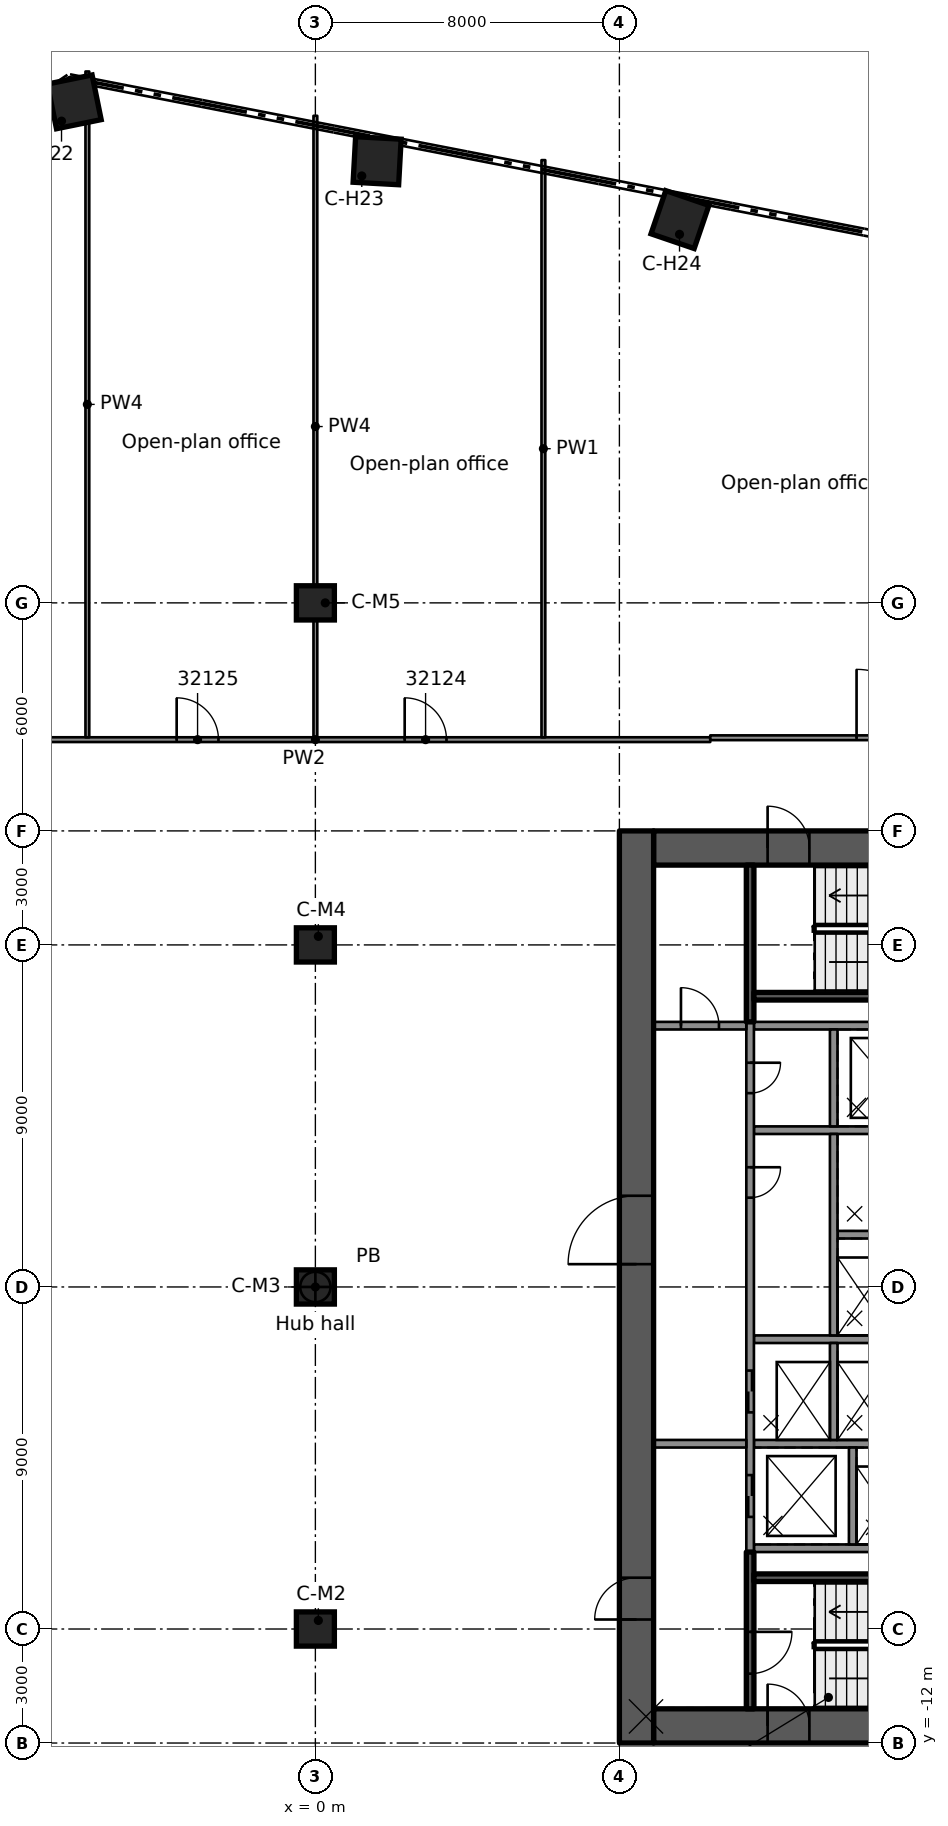
"""IFC4 building model, lengths in metres.
Left out: names, types, materials, properties, quantities, classifications, styles, units other than length and angle.
Written with IfcOpenShell. Run it as: python <this file> out.ifc"""

import sys

from ifc_helpers import new_model, si_unit, direction, frame, frame_2d, origin, origin_2d, place, context, subcontext, project, spatial, rectangle, extrude, element, fill, save


model = new_model("IFC4")
c1 = context("Model", 3, precision=1e-05, world=origin(), true_north=direction((0.0, 1.0)))
c2 = subcontext(c1, "Body", "Model", "MODEL_VIEW")
j1 = project(units=[si_unit("LENGTHUNIT", "METRE"), si_unit("PLANEANGLEUNIT", "RADIAN")], contexts=[c1])
p1 = place(None, origin())
s1 = spatial("IfcSite", under=j1, at=p1, CompositionType="ELEMENT")
p2 = place(p1, origin())
s2 = spatial("IfcBuilding", under=s1, at=p2, CompositionType="ELEMENT")
p3 = place(p2, frame((0.0, 0.0, 159.6)))
s3 = spatial("IfcBuildingStorey", under=s2, at=p3, CompositionType="ELEMENT", Elevation=159.6)
p4 = place(p3, frame((8.9, 11.55, 0.0), z_axis=(0.0, 0.0, 1.0), x_axis=(1.0, 0.0, 0.0)))
e1 = element("IfcWall", 1, at=p4, inside=s3, PredefinedType="SHEAR", context=c2, shape_type="SweptSolid", body=[
    extrude(rectangle(XDim=9.2, YDim=0.9, at=frame_2d((4.6, 0.0))), origin(), (0.0, 0.0, 1.0), 3.5),
])
p5 = place(p4, frame((3.0, 0.0, 0.0)))
e2 = element("IfcOpeningElement", 2, at=p5, cuts=e1, PredefinedType="OPENING", context=c2, shape_type="SweptSolid", body=[
    extrude(rectangle(XDim=1.1, YDim=2.1, at=frame_2d((0.55, 1.05))), frame((0.0, 0.46, 0.0), z_axis=(0.0, -1.0, 0.0), x_axis=(1.0, 0.0, 0.0)), (0.0, 0.0, 1.0), 0.92),
])
p6 = place(p3, frame((8.9, -11.55, 0.0), z_axis=(0.0, 0.0, 1.0), x_axis=(1.0, 0.0, 0.0)))
e3 = element("IfcWall", 3, at=p6, inside=s3, PredefinedType="SHEAR", context=c2, shape_type="SweptSolid", body=[
    extrude(rectangle(XDim=9.2, YDim=0.9, at=frame_2d((4.6, 0.0))), origin(), (0.0, 0.0, 1.0), 3.5),
])
p7 = place(p6, frame((3.0, 0.0, 0.0)))
e4 = element("IfcOpeningElement", 4, at=p7, cuts=e3, PredefinedType="OPENING", context=c2, shape_type="SweptSolid", body=[
    extrude(rectangle(XDim=1.1, YDim=2.1, at=frame_2d((0.55, 1.05))), frame((0.0, 0.46, 0.0), z_axis=(0.0, -1.0, 0.0), x_axis=(1.0, 0.0, 0.0)), (0.0, 0.0, 1.0), 0.92),
])
p8 = place(p3, frame((8.45, -12.0, 0.0), z_axis=(0.0, 0.0, 1.0), x_axis=(0.0, 1.0, 0.0)))
e5 = element("IfcWall", 5, at=p8, inside=s3, PredefinedType="SHEAR", context=c2, shape_type="SweptSolid", body=[
    extrude(rectangle(XDim=24.0, YDim=0.9, at=frame_2d((12.0, 0.0))), origin(), (0.0, 0.0, 1.0), 3.5),
])
p9 = place(p8, frame((12.6, 0.0, 0.0)))
e6 = element("IfcOpeningElement", 6, at=p9, cuts=e5, PredefinedType="OPENING", context=c2, shape_type="SweptSolid", body=[
    extrude(rectangle(XDim=1.8, YDim=2.1, at=frame_2d((0.9, 1.05))), frame((0.0, 0.46, 0.0), z_axis=(0.0, -1.0, 0.0), x_axis=(1.0, 0.0, 0.0)), (0.0, 0.0, 1.0), 0.92),
])
p10 = place(p8, frame((3.25, 0.0, 0.0)))
e7 = element("IfcOpeningElement", 7, at=p10, cuts=e5, PredefinedType="OPENING", context=c2, shape_type="SweptSolid", body=[
    extrude(rectangle(XDim=1.1, YDim=2.1, at=frame_2d((0.55, 1.05))), frame((0.0, 0.46, 0.0), z_axis=(0.0, -1.0, 0.0), x_axis=(1.0, 0.0, 0.0)), (0.0, 0.0, 1.0), 0.92),
])
for number, where, z_axis, x_axis in (
    (8, (-6.344, 31.183, 0.0), (0.0, 0.0, 1.0), (-0.199, 0.98, 0.0)),
    (9, (1.625, 29.634, 0.0), (0.0, 0.0, 1.0), (0.055, 0.998, 0.0)),
    (10, (9.594, 28.085, 0.0), (0.0, 0.0, 1.0), (0.323, 0.946, 0.0)),
):
    element("IfcColumn", number, at=place(p3, frame(where, z_axis=z_axis, x_axis=x_axis)), inside=s3, PredefinedType="COLUMN", context=c2, shape_type="SweptSolid", body=[
        extrude(rectangle(XDim=1.2, YDim=1.2, at=origin_2d()), origin(), (0.0, 0.0, 1.0), 3.5),
    ])
for number, where, z_axis, x_axis in (
    (11, (0.0, -9.0, 0.0), (0.0, 0.0, 1.0), (1.0, 0.0, 0.0)),
    (12, (0.0, 0.0, 0.0), (0.0, 0.0, 1.0), (1.0, 0.0, 0.0)),
    (13, (0.0, 9.0, 0.0), (0.0, 0.0, 1.0), (1.0, 0.0, 0.0)),
    (14, (0.0, 18.0, 0.0), (0.0, 0.0, 1.0), (1.0, 0.0, 0.0)),
):
    element("IfcColumn", number, at=place(p3, frame(where, z_axis=z_axis, x_axis=x_axis)), inside=s3, PredefinedType="COLUMN", context=c2, shape_type="SweptSolid", body=[
        extrude(rectangle(XDim=1.0, YDim=0.9, at=origin_2d()), origin(), (0.0, 0.0, 1.0), 3.5),
    ])
for number, where, z_axis, x_axis in (
    (15, (11.54, -6.875, 0.0), (0.0, 0.0, 1.0), (1.0, 0.0, 0.0)),
    (16, (11.54, 6.875, 0.0), (0.0, 0.0, 1.0), (1.0, 0.0, 0.0)),
):
    element("IfcWall", number, at=place(p3, frame(where, z_axis=z_axis, x_axis=x_axis)), inside=s3, PredefinedType="SOLIDWALL", context=c2, shape_type="SweptSolid", body=[
        extrude(rectangle(XDim=6.56, YDim=0.2, at=frame_2d((3.28, 0.0))), origin(), (0.0, 0.0, 1.0), 3.09),
    ])
p11 = place(p3, frame((11.54, 4.125, 0.0), z_axis=(0.0, 0.0, 1.0), x_axis=(1.0, 0.0, 0.0)))
e17 = element("IfcWall", 17, at=p11, inside=s3, PredefinedType="SOLIDWALL", context=c2, shape_type="SweptSolid", body=[
    extrude(rectangle(XDim=4.7, YDim=0.2, at=frame_2d((2.35, 0.0))), origin(), (0.0, 0.0, 1.0), 3.09),
])
p12 = place(p3, frame((13.74, 1.375, 0.0), z_axis=(0.0, 0.0, 1.0), x_axis=(1.0, 0.0, 0.0)))
e18 = element("IfcWall", 18, at=p12, inside=s3, PredefinedType="SOLIDWALL", context=c2, shape_type="SweptSolid", body=[
    extrude(rectangle(XDim=2.0, YDim=0.2, at=frame_2d((1.0, 0.0))), origin(), (0.0, 0.0, 1.0), 3.09),
])
p13 = place(p3, frame((11.54, -1.375, 0.0), z_axis=(0.0, 0.0, 1.0), x_axis=(1.0, 0.0, 0.0)))
e19 = element("IfcWall", 19, at=p13, inside=s3, PredefinedType="SOLIDWALL", context=c2, shape_type="SweptSolid", body=[
    extrude(rectangle(XDim=4.2, YDim=0.2, at=frame_2d((2.1, 0.0))), origin(), (0.0, 0.0, 1.0), 3.09),
])
p14 = place(p3, frame((11.54, -4.125, 0.0), z_axis=(0.0, 0.0, 1.0), x_axis=(1.0, 0.0, 0.0)))
e20 = element("IfcWall", 20, at=p14, inside=s3, PredefinedType="SOLIDWALL", context=c2, shape_type="SweptSolid", body=[
    extrude(rectangle(XDim=4.7, YDim=0.2, at=frame_2d((2.35, 0.0))), origin(), (0.0, 0.0, 1.0), 3.09),
])
p15 = place(p3, frame((11.44, 6.975, 0.0), z_axis=(0.0, 0.0, 1.0), x_axis=(0.0, -1.0, 0.0)))
e21 = element("IfcWall", 21, at=p15, inside=s3, PredefinedType="SOLIDWALL", context=c2, shape_type="SweptSolid", body=[
    extrude(rectangle(XDim=13.95, YDim=0.2, at=frame_2d((6.975, 0.0))), origin(), (0.0, 0.0, 1.0), 3.09),
])
p16 = place(p15, frame((9.175, 0.0, 0.0)))
e22 = element("IfcOpeningElement", 22, at=p16, cuts=e21, PredefinedType="OPENING", context=c2, shape_type="SweptSolid", body=[
    extrude(rectangle(XDim=1.1, YDim=2.1, at=frame_2d((0.55, 1.05))), frame((0.0, 0.11, 0.0), z_axis=(0.0, -1.0, 0.0), x_axis=(1.0, 0.0, 0.0)), (0.0, 0.0, 1.0), 0.22),
])
p17 = place(p15, frame((11.925, 0.0, 0.0)))
e23 = element("IfcOpeningElement", 23, at=p17, cuts=e21, PredefinedType="OPENING", context=c2, shape_type="SweptSolid", body=[
    extrude(rectangle(XDim=1.1, YDim=2.1, at=frame_2d((0.55, 1.05))), frame((0.0, 0.11, 0.0), z_axis=(0.0, -1.0, 0.0), x_axis=(1.0, 0.0, 0.0)), (0.0, 0.0, 1.0), 0.22),
])
p18 = place(p15, frame((1.075, 0.0, 0.0)))
e24 = element("IfcOpeningElement", 24, at=p18, cuts=e21, PredefinedType="OPENING", context=c2, shape_type="SweptSolid", body=[
    extrude(rectangle(XDim=0.8, YDim=2.1, at=frame_2d((0.4, 1.05))), frame((0.0, 0.11, 0.0), z_axis=(0.0, -1.0, 0.0), x_axis=(1.0, 0.0, 0.0)), (0.0, 0.0, 1.0), 0.22),
])
p19 = place(p15, frame((3.825, 0.0, 0.0)))
e25 = element("IfcOpeningElement", 25, at=p19, cuts=e21, PredefinedType="OPENING", context=c2, shape_type="SweptSolid", body=[
    extrude(rectangle(XDim=0.8, YDim=2.1, at=frame_2d((0.4, 1.05))), frame((0.0, 0.11, 0.0), z_axis=(0.0, -1.0, 0.0), x_axis=(1.0, 0.0, 0.0)), (0.0, 0.0, 1.0), 0.22),
])
p20 = place(p3, frame((13.64, 6.775, 0.0), z_axis=(0.0, 0.0, 1.0), x_axis=(0.0, -1.0, 0.0)))
e26 = element("IfcWall", 26, at=p20, inside=s3, PredefinedType="SOLIDWALL", context=c2, shape_type="SweptSolid", body=[
    extrude(rectangle(XDim=2.55, YDim=0.2, at=frame_2d((1.275, 0.0))), origin(), (0.0, 0.0, 1.0), 3.09),
])
p21 = place(p3, frame((13.64, 4.025, 0.0), z_axis=(0.0, 0.0, 1.0), x_axis=(0.0, -1.0, 0.0)))
e27 = element("IfcWall", 27, at=p21, inside=s3, PredefinedType="SOLIDWALL", context=c2, shape_type="SweptSolid", body=[
    extrude(rectangle(XDim=5.3, YDim=0.2, at=frame_2d((2.65, 0.0))), origin(), (0.0, 0.0, 1.0), 3.09),
])
for number, where, z_axis, x_axis in (
    (28, (13.64, -1.475, 0.0), (0.0, 0.0, 1.0), (0.0, -1.0, 0.0)),
    (29, (14.14, -4.225, 0.0), (0.0, 0.0, 1.0), (0.0, -1.0, 0.0)),
):
    element("IfcWall", number, at=place(p3, frame(where, z_axis=z_axis, x_axis=x_axis)), inside=s3, PredefinedType="SOLIDWALL", context=c2, shape_type="SweptSolid", body=[
        extrude(rectangle(XDim=2.55, YDim=0.2, at=frame_2d((1.275, 0.0))), origin(), (0.0, 0.0, 1.0), 3.09),
    ])
p22 = place(p3, frame((11.44, -6.975, 0.0), z_axis=(0.0, 0.0, 1.0), x_axis=(0.0, -1.0, 0.0)))
e30 = element("IfcWall", 30, at=p22, inside=s3, PredefinedType="SOLIDWALL", context=c2, shape_type="SweptSolid", body=[
    extrude(rectangle(XDim=4.125, YDim=0.2, at=frame_2d((2.062, 0.0))), origin(), (0.0, 0.0, 1.0), 3.09),
])
p23 = place(p22, frame((2.1, 0.0, 0.0)))
e31 = element("IfcOpeningElement", 31, at=p23, cuts=e30, PredefinedType="OPENING", context=c2, shape_type="SweptSolid", body=[
    extrude(rectangle(XDim=1.1, YDim=2.1, at=frame_2d((0.55, 1.05))), frame((0.0, 0.11, 0.0), z_axis=(0.0, -1.0, 0.0), x_axis=(1.0, 0.0, 0.0)), (0.0, 0.0, 1.0), 0.22),
])
p24 = place(p3, frame((11.54, -7.65, 0.0), z_axis=(0.0, 0.0, 1.0), x_axis=(1.0, 0.0, 0.0)))
e32 = element("IfcWall", 32, at=p24, inside=s3, PredefinedType="SOLIDWALL", context=c2, shape_type="SweptSolid", body=[
    extrude(rectangle(XDim=6.56, YDim=0.2, at=frame_2d((3.28, 0.0))), origin(), (0.0, 0.0, 1.0), 3.09),
])
p25 = place(p3, frame((11.44, 11.1, 0.0), z_axis=(0.0, 0.0, 1.0), x_axis=(0.0, -1.0, 0.0)))
e33 = element("IfcWall", 33, at=p25, inside=s3, PredefinedType="SOLIDWALL", context=c2, shape_type="SweptSolid", body=[
    extrude(rectangle(XDim=4.125, YDim=0.2, at=frame_2d((2.062, 0.0))), origin(), (0.0, 0.0, 1.0), 3.09),
])
p26 = place(p3, frame((11.54, 7.65, 0.0), z_axis=(0.0, 0.0, 1.0), x_axis=(1.0, 0.0, 0.0)))
e34 = element("IfcWall", 34, at=p26, inside=s3, PredefinedType="SOLIDWALL", context=c2, shape_type="SweptSolid", body=[
    extrude(rectangle(XDim=6.56, YDim=0.2, at=frame_2d((3.28, 0.0))), origin(), (0.0, 0.0, 1.0), 3.09),
])
p27 = place(p3, frame((8.9, -4.125, 0.0), z_axis=(0.0, 0.0, 1.0), x_axis=(1.0, 0.0, 0.0)))
e35 = element("IfcWall", 35, at=p27, inside=s3, PredefinedType="PARTITIONING", context=c2, shape_type="SweptSolid", body=[
    extrude(rectangle(XDim=2.44, YDim=0.2, at=frame_2d((1.22, 0.0))), origin(), (0.0, 0.0, 1.0), 3.09),
])
p28 = place(p3, frame((8.9, 6.875, 0.0), z_axis=(0.0, 0.0, 1.0), x_axis=(1.0, 0.0, 0.0)))
e36 = element("IfcWall", 36, at=p28, inside=s3, PredefinedType="PARTITIONING", context=c2, shape_type="SweptSolid", body=[
    extrude(rectangle(XDim=2.44, YDim=0.2, at=frame_2d((1.22, 0.0))), origin(), (0.0, 0.0, 1.0), 3.09),
])
p29 = place(p28, frame((0.72, 0.0, 0.0)))
e37 = element("IfcOpeningElement", 37, at=p29, cuts=e36, PredefinedType="OPENING", context=c2, shape_type="SweptSolid", body=[
    extrude(rectangle(XDim=1.0, YDim=2.1, at=frame_2d((0.5, 1.05))), frame((0.0, 0.11, 0.0), z_axis=(0.0, -1.0, 0.0), x_axis=(1.0, 0.0, 0.0)), (0.0, 0.0, 1.0), 0.22),
])
p30 = place(p3, frame((-10.39, 14.401, 0.0), z_axis=(0.0, 0.0, 1.0), x_axis=(1.0, 0.0, 0.0)))
e38 = element("IfcWall", 38, at=p30, inside=s3, PredefinedType="PARTITIONING", context=c2, shape_type="SweptSolid", body=[
    extrude(rectangle(XDim=20.781, YDim=0.125, at=frame_2d((10.391, 0.0))), origin(), (0.0, 0.0, 1.0), 3.08),
])
p31 = place(p30, frame((12.74, 0.0, 0.0)))
e39 = element("IfcOpeningElement", 39, at=p31, cuts=e38, PredefinedType="OPENING", context=c2, shape_type="SweptSolid", body=[
    extrude(rectangle(XDim=1.1, YDim=2.1, at=frame_2d((0.55, 1.05))), frame((0.0, 0.073, 0.0), z_axis=(0.0, -1.0, 0.0), x_axis=(1.0, 0.0, 0.0)), (0.0, 0.0, 1.0), 0.145),
])
p32 = place(p30, frame((6.74, 0.0, 0.0)))
e40 = element("IfcOpeningElement", 40, at=p32, cuts=e38, PredefinedType="OPENING", context=c2, shape_type="SweptSolid", body=[
    extrude(rectangle(XDim=1.1, YDim=2.1, at=frame_2d((0.55, 1.05))), frame((0.0, 0.073, 0.0), z_axis=(0.0, -1.0, 0.0), x_axis=(1.0, 0.0, 0.0)), (0.0, 0.0, 1.0), 0.145),
])
p33 = place(p3, frame((10.391, 14.451, 0.0), z_axis=(0.0, 0.0, 1.0), x_axis=(1.0, 0.0, 0.0)))
e41 = element("IfcWall", 41, at=p33, inside=s3, PredefinedType="PARTITIONING", context=c2, shape_type="SweptSolid", body=[
    extrude(rectangle(XDim=10.996, YDim=0.125, at=frame_2d((5.498, 0.0))), origin(), (0.0, 0.0, 1.0), 3.08),
])
p34 = place(p33, frame((3.85, 0.0, 0.0)))
e42 = element("IfcOpeningElement", 42, at=p34, cuts=e41, PredefinedType="OPENING", context=c2, shape_type="SweptSolid", body=[
    extrude(rectangle(XDim=1.8, YDim=2.1, at=frame_2d((0.9, 1.05))), frame((0.0, 0.073, 0.0), z_axis=(0.0, -1.0, 0.0), x_axis=(1.0, 0.0, 0.0)), (0.0, 0.0, 1.0), 0.145),
])
p35 = place(p3, frame((6.0, 14.463, 0.0), z_axis=(0.0, 0.0, 1.0), x_axis=(0.0, 1.0, 0.0)))
e43 = element("IfcWall", 43, at=p35, inside=s3, PredefinedType="PARTITIONING", context=c2, shape_type="SweptSolid", body=[
    extrude(rectangle(XDim=15.187, YDim=0.1, at=frame_2d((7.594, 0.0))), origin(), (0.0, 0.0, 1.0), 3.08),
])
p36 = place(p3, frame((0.0, 14.463, 0.0), z_axis=(0.0, 0.0, 1.0), x_axis=(0.0, 1.0, 0.0)))
e44 = element("IfcWall", 44, at=p36, inside=s3, PredefinedType="PARTITIONING", context=c2, shape_type="SweptSolid", body=[
    extrude(rectangle(XDim=16.353, YDim=0.1, at=frame_2d((8.177, 0.0))), origin(), (0.0, 0.0, 1.0), 2.445),
])
p37 = place(p3, frame((-6.0, 14.463, 0.0), z_axis=(0.0, 0.0, 1.0), x_axis=(0.0, 1.0, 0.0)))
e45 = element("IfcWall", 45, at=p37, inside=s3, PredefinedType="PARTITIONING", context=c2, shape_type="SweptSolid", body=[
    extrude(rectangle(XDim=17.519, YDim=0.1, at=frame_2d((8.76, 0.0))), origin(), (0.0, 0.0, 1.0), 2.445),
])
p38 = place(p16, origin())
e46 = element("IfcDoor", 46, at=p38, inside=s3, OperationType="DOUBLE_DOOR_SLIDING", PredefinedType="DOOR", context=c2, shape_type="SweptSolid", body=[
    extrude(rectangle(XDim=1.1, YDim=2.1, at=frame_2d((0.55, 1.05))), frame((0.0, 0.025, 0.0), z_axis=(0.0, -1.0, 0.0), x_axis=(1.0, 0.0, 0.0)), (0.0, 0.0, 1.0), 0.05),
])
fill(e22, e46)
p39 = place(p17, origin())
e47 = element("IfcDoor", 47, at=p39, inside=s3, OperationType="DOUBLE_DOOR_SLIDING", PredefinedType="DOOR", context=c2, shape_type="SweptSolid", body=[
    extrude(rectangle(XDim=1.1, YDim=2.1, at=frame_2d((0.55, 1.05))), frame((0.0, 0.025, 0.0), z_axis=(0.0, -1.0, 0.0), x_axis=(1.0, 0.0, 0.0)), (0.0, 0.0, 1.0), 0.05),
])
fill(e23, e47)
p40 = place(p18, origin())
e48 = element("IfcDoor", 48, at=p40, inside=s3, OperationType="SINGLE_SWING_LEFT", PredefinedType="DOOR", context=c2, shape_type="SweptSolid", body=[
    extrude(rectangle(XDim=0.8, YDim=2.1, at=frame_2d((0.4, 1.05))), frame((0.0, 0.025, 0.0), z_axis=(0.0, -1.0, 0.0), x_axis=(1.0, 0.0, 0.0)), (0.0, 0.0, 1.0), 0.05),
])
fill(e24, e48)
p41 = place(p19, origin())
e49 = element("IfcDoor", 49, at=p41, inside=s3, OperationType="SINGLE_SWING_LEFT", PredefinedType="DOOR", context=c2, shape_type="SweptSolid", body=[
    extrude(rectangle(XDim=0.8, YDim=2.1, at=frame_2d((0.4, 1.05))), frame((0.0, 0.025, 0.0), z_axis=(0.0, -1.0, 0.0), x_axis=(1.0, 0.0, 0.0)), (0.0, 0.0, 1.0), 0.05),
])
fill(e25, e49)
p42 = place(p9, origin())
e50 = element("IfcDoor", 50, at=p42, inside=s3, OperationType="SINGLE_SWING_RIGHT", PredefinedType="DOOR", context=c2, shape_type="SweptSolid", body=[
    extrude(rectangle(XDim=1.8, YDim=2.1, at=frame_2d((0.9, 1.05))), frame((0.0, 0.025, 0.0), z_axis=(0.0, -1.0, 0.0), x_axis=(1.0, 0.0, 0.0)), (0.0, 0.0, 1.0), 0.05),
])
fill(e6, e50)
p43 = place(p10, origin())
e51 = element("IfcDoor", 51, at=p43, inside=s3, OperationType="SINGLE_SWING_LEFT", PredefinedType="DOOR", context=c2, shape_type="SweptSolid", body=[
    extrude(rectangle(XDim=1.1, YDim=2.1, at=frame_2d((0.55, 1.05))), frame((0.0, 0.025, 0.0), z_axis=(0.0, -1.0, 0.0), x_axis=(1.0, 0.0, 0.0)), (0.0, 0.0, 1.0), 0.05),
])
fill(e7, e51)
p44 = place(p7, origin())
e52 = element("IfcDoor", 52, at=p44, inside=s3, OperationType="SINGLE_SWING_LEFT", PredefinedType="DOOR", context=c2, shape_type="SweptSolid", body=[
    extrude(rectangle(XDim=1.1, YDim=2.1, at=frame_2d((0.55, 1.05))), frame((0.0, 0.025, 0.0), z_axis=(0.0, -1.0, 0.0), x_axis=(1.0, 0.0, 0.0)), (0.0, 0.0, 1.0), 0.05),
])
fill(e4, e52)
p45 = place(p5, origin())
e53 = element("IfcDoor", 53, at=p45, inside=s3, OperationType="SINGLE_SWING_LEFT", PredefinedType="DOOR", context=c2, shape_type="SweptSolid", body=[
    extrude(rectangle(XDim=1.1, YDim=2.1, at=frame_2d((0.55, 1.05))), frame((0.0, 0.025, 0.0), z_axis=(0.0, -1.0, 0.0), x_axis=(1.0, 0.0, 0.0)), (0.0, 0.0, 1.0), 0.05),
])
fill(e2, e53)
p46 = place(p23, origin())
e54 = element("IfcDoor", 54, at=p46, inside=s3, OperationType="SINGLE_SWING_RIGHT", PredefinedType="DOOR", context=c2, shape_type="SweptSolid", body=[
    extrude(rectangle(XDim=1.1, YDim=2.1, at=frame_2d((0.55, 1.05))), frame((0.0, 0.025, 0.0), z_axis=(0.0, -1.0, 0.0), x_axis=(1.0, 0.0, 0.0)), (0.0, 0.0, 1.0), 0.05),
])
fill(e31, e54)
p47 = place(p29, origin())
e55 = element("IfcDoor", 55, at=p47, inside=s3, OperationType="SINGLE_SWING_RIGHT", PredefinedType="DOOR", context=c2, shape_type="SweptSolid", body=[
    extrude(rectangle(XDim=1.0, YDim=2.1, at=frame_2d((0.5, 1.05))), frame((0.0, 0.025, 0.0), z_axis=(0.0, -1.0, 0.0), x_axis=(1.0, 0.0, 0.0)), (0.0, 0.0, 1.0), 0.05),
])
fill(e37, e55)
p48 = place(p34, origin())
e56 = element("IfcDoor", 56, at=p48, inside=s3, OperationType="DOUBLE_DOOR_SINGLE_SWING", PredefinedType="DOOR", context=c2, shape_type="SweptSolid", body=[
    extrude(rectangle(XDim=1.8, YDim=2.1, at=frame_2d((0.9, 1.05))), frame((0.0, 0.025, 0.0), z_axis=(0.0, -1.0, 0.0), x_axis=(1.0, 0.0, 0.0)), (0.0, 0.0, 1.0), 0.05),
])
fill(e42, e56)
p49 = place(p31, origin())
e57 = element("IfcDoor", 57, at=p49, inside=s3, OperationType="SINGLE_SWING_RIGHT", PredefinedType="DOOR", context=c2, shape_type="SweptSolid", body=[
    extrude(rectangle(XDim=1.1, YDim=2.1, at=frame_2d((0.55, 1.05))), frame((0.0, 0.025, 0.0), z_axis=(0.0, -1.0, 0.0), x_axis=(1.0, 0.0, 0.0)), (0.0, 0.0, 1.0), 0.05),
])
fill(e39, e57)
p50 = place(p32, origin())
e58 = element("IfcDoor", 58, at=p50, inside=s3, OperationType="SINGLE_SWING_LEFT", PredefinedType="DOOR", context=c2, shape_type="SweptSolid", body=[
    extrude(rectangle(XDim=1.1, YDim=2.1, at=frame_2d((0.55, 1.05))), frame((0.0, 0.025, 0.0), z_axis=(0.0, -1.0, 0.0), x_axis=(1.0, 0.0, 0.0)), (0.0, 0.0, 1.0), 0.05),
])
fill(e40, e58)
save(model, sys.argv[1])
